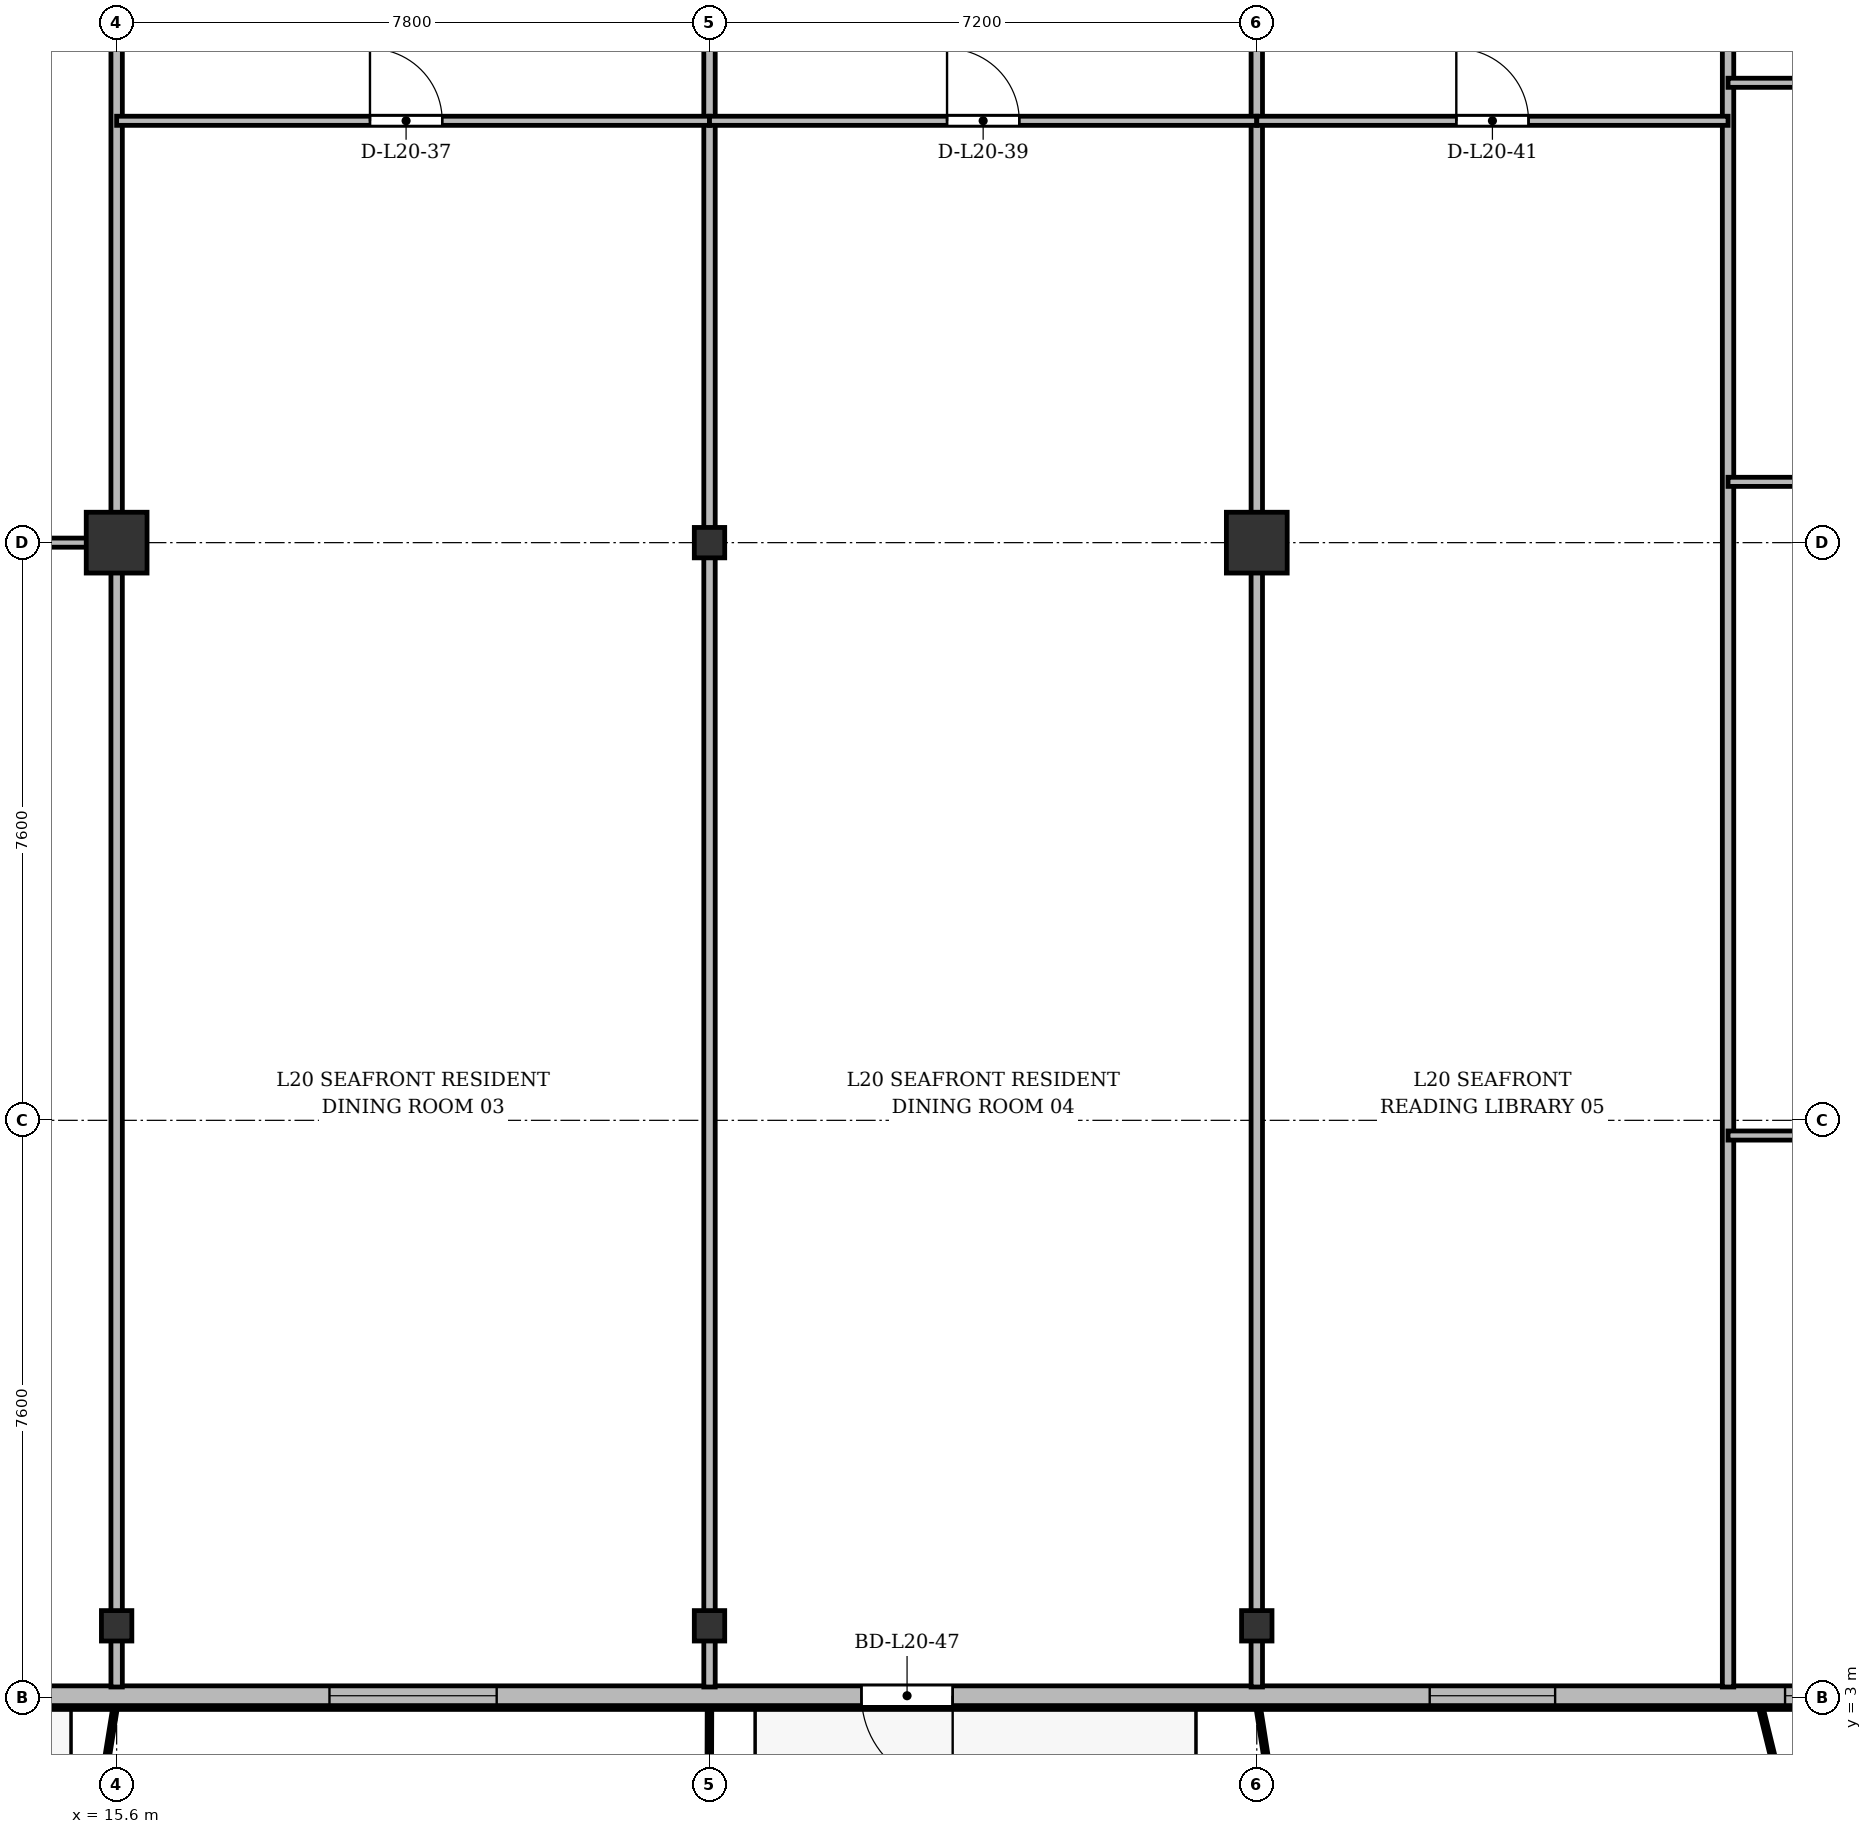
"""IFC4 building model, lengths in metres.
Left out: names, types, materials, properties, quantities, classifications, styles, units other than length and angle.
Written with IfcOpenShell. Run it as: python <this file> out.ifc"""

import sys

from ifc_helpers import new_model, si_unit, direction, frame, frame_2d, origin, origin_2d, place, context, subcontext, project, spatial, rectangle, i_section, extrude, source, transform, mapped, element, fill, save


model = new_model("IFC4")
c1 = context("Model", 3, precision=1e-05, world=origin(), true_north=direction((0.0, 1.0)))
c2 = subcontext(c1, "Body", "Model", "MODEL_VIEW")
j1 = project(units=[si_unit("LENGTHUNIT", "METRE"), si_unit("PLANEANGLEUNIT", "RADIAN")], contexts=[c1])
p1 = place(None, origin())
s1 = spatial("IfcSite", under=j1, at=p1, CompositionType="ELEMENT")
p2 = place(p1, origin())
s2 = spatial("IfcBuilding", under=s1, at=p2, CompositionType="ELEMENT")
p3 = place(p2, frame((0.0, 0.0, 81.7)))
s3 = spatial("IfcBuildingStorey", under=s2, at=p3, CompositionType="ELEMENT", Elevation=81.7)
m1 = source(origin(), c2, "Body", "SweptSolid", [
    extrude(i_section(OverallWidth=0.4, OverallDepth=0.4, WebThickness=0.022, FlangeThickness=0.035, at=origin_2d()), origin(), (0.0, 0.0, 1.0), 3.6),
])
p4 = place(p3, frame((15.6, 3.95, 0.0), z_axis=(0.0, 0.0, 1.0), x_axis=(1.0, 0.0, 0.0)))
e1 = element("IfcColumn", 1, at=p4, inside=s3, PredefinedType="COLUMN", context=c2, shape_type="MappedRepresentation", body=[
    mapped(m1, transform((0.0, 0.0, 0.0), x_axis=(1.0, 0.0, 0.0), y_axis=(0.0, 1.0, 0.0), z_axis=(0.0, 0.0, 1.0), scale=1.0)),
])
m2 = source(origin(), c2, "Body", "SweptSolid", [
    extrude(rectangle(XDim=0.8, YDim=0.8, at=origin_2d()), origin(), (0.0, 0.0, 1.0), 3.6),
])
p5 = place(p3, frame((15.6, 18.2, 0.0), z_axis=(0.0, 0.0, 1.0), x_axis=(1.0, 0.0, 0.0)))
e2 = element("IfcColumn", 2, at=p5, inside=s3, PredefinedType="COLUMN", context=c2, shape_type="MappedRepresentation", body=[
    mapped(m2, transform((0.0, 0.0, 0.0), x_axis=(1.0, 0.0, 0.0), y_axis=(0.0, 1.0, 0.0), z_axis=(0.0, 0.0, 1.0), scale=1.0)),
])
for number, where, z_axis, x_axis in (
    (3, (23.4, 3.95, 0.0), (0.0, 0.0, 1.0), (1.0, 0.0, 0.0)),
    (4, (23.4, 18.2, 0.0), (0.0, 0.0, 1.0), (1.0, 0.0, 0.0)),
    (5, (30.6, 3.95, 0.0), (0.0, 0.0, 1.0), (1.0, 0.0, 0.0)),
):
    element("IfcColumn", number, at=place(p3, frame(where, z_axis=z_axis, x_axis=x_axis)), inside=s3, PredefinedType="COLUMN", context=c2, shape_type="MappedRepresentation", body=[
        mapped(m1, transform((0.0, 0.0, 0.0), x_axis=(1.0, 0.0, 0.0), y_axis=(0.0, 1.0, 0.0), z_axis=(0.0, 0.0, 1.0), scale=1.0)),
    ])
p6 = place(p3, frame((30.6, 18.2, 0.0), z_axis=(0.0, 0.0, 1.0), x_axis=(1.0, 0.0, 0.0)))
e6 = element("IfcColumn", 6, at=p6, inside=s3, PredefinedType="COLUMN", context=c2, shape_type="MappedRepresentation", body=[
    mapped(m2, transform((0.0, 0.0, 0.0), x_axis=(1.0, 0.0, 0.0), y_axis=(0.0, 1.0, 0.0), z_axis=(0.0, 0.0, 1.0), scale=1.0)),
])
p7 = place(p3, frame((66.9, 3.03, 0.0), z_axis=(0.0, 0.0, 1.0), x_axis=(-1.0, 0.0, 0.0)))
e7 = element("IfcWall", 7, at=p7, inside=s3, PredefinedType="SOLIDWALL", context=c2, shape_type="SweptSolid", body=[
    extrude(rectangle(XDim=59.4, YDim=0.26, at=frame_2d((29.7, 0.0))), origin(), (0.0, 0.0, 1.0), 3.34),
])
p8 = place(p7, frame((0.795, 0.0, 0.9)))
e8 = element("IfcOpeningElement", 8, at=p8, cuts=e7, PredefinedType="OPENING", context=c2, shape_type="SweptSolid", body=[
    extrude(rectangle(XDim=1.8, YDim=1.8, at=frame_2d((0.9, 0.9))), frame((0.0, 0.14, 0.0), z_axis=(0.0, -1.0, 0.0), x_axis=(1.0, 0.0, 0.0)), (0.0, 0.0, 1.0), 0.28),
])
p9 = place(p7, frame((4.6, 0.0, 0.9)))
e9 = element("IfcOpeningElement", 9, at=p9, cuts=e7, PredefinedType="OPENING", context=c2, shape_type="SweptSolid", body=[
    extrude(rectangle(XDim=2.2, YDim=1.8, at=frame_2d((1.1, 0.9))), frame((0.0, 0.14, 0.0), z_axis=(0.0, -1.0, 0.0), x_axis=(1.0, 0.0, 0.0)), (0.0, 0.0, 1.0), 0.28),
])
p10 = place(p7, frame((9.18, 0.0, 0.0)))
e10 = element("IfcOpeningElement", 10, at=p10, cuts=e7, PredefinedType="OPENING", context=c2, shape_type="SweptSolid", body=[
    extrude(rectangle(XDim=1.2, YDim=2.2, at=frame_2d((0.6, 1.1))), frame((0.0, 0.14, 0.0), z_axis=(0.0, -1.0, 0.0), x_axis=(1.0, 0.0, 0.0)), (0.0, 0.0, 1.0), 0.28),
])
p11 = place(p7, frame((12.95, 0.0, 0.9)))
e11 = element("IfcOpeningElement", 11, at=p11, cuts=e7, PredefinedType="OPENING", context=c2, shape_type="SweptSolid", body=[
    extrude(rectangle(XDim=2.0, YDim=1.95, at=frame_2d((1.0, 0.975))), frame((0.0, 0.14, 0.0), z_axis=(0.0, -1.0, 0.0), x_axis=(1.0, 0.0, 0.0)), (0.0, 0.0, 1.0), 0.28),
])
p12 = place(p7, frame((16.275, 0.0, 0.9)))
e12 = element("IfcOpeningElement", 12, at=p12, cuts=e7, PredefinedType="OPENING", context=c2, shape_type="SweptSolid", body=[
    extrude(rectangle(XDim=1.65, YDim=1.85, at=frame_2d((0.825, 0.925))), frame((0.0, 0.14, 0.0), z_axis=(0.0, -1.0, 0.0), x_axis=(1.0, 0.0, 0.0)), (0.0, 0.0, 1.0), 0.28),
])
p13 = place(p7, frame((18.6, 0.0, 0.9)))
e13 = element("IfcOpeningElement", 13, at=p13, cuts=e7, PredefinedType="OPENING", context=c2, shape_type="SweptSolid", body=[
    extrude(rectangle(XDim=1.8, YDim=1.8, at=frame_2d((0.9, 0.9))), frame((0.0, 0.14, 0.0), z_axis=(0.0, -1.0, 0.0), x_axis=(1.0, 0.0, 0.0)), (0.0, 0.0, 1.0), 0.28),
])
p14 = place(p7, frame((21.15, 0.0, 0.9)))
e14 = element("IfcOpeningElement", 14, at=p14, cuts=e7, PredefinedType="OPENING", context=c2, shape_type="SweptSolid", body=[
    extrude(rectangle(XDim=1.5, YDim=1.75, at=frame_2d((0.75, 0.875))), frame((0.0, 0.14, 0.0), z_axis=(0.0, -1.0, 0.0), x_axis=(1.0, 0.0, 0.0)), (0.0, 0.0, 1.0), 0.28),
])
p15 = place(p7, frame((24.1, 0.0, 0.9)))
e15 = element("IfcOpeningElement", 15, at=p15, cuts=e7, PredefinedType="OPENING", context=c2, shape_type="SweptSolid", body=[
    extrude(rectangle(XDim=1.5, YDim=1.75, at=frame_2d((0.75, 0.875))), frame((0.0, 0.14, 0.0), z_axis=(0.0, -1.0, 0.0), x_axis=(1.0, 0.0, 0.0)), (0.0, 0.0, 1.0), 0.28),
])
p16 = place(p7, frame((27.35, 0.0, 0.9)))
e16 = element("IfcOpeningElement", 16, at=p16, cuts=e7, PredefinedType="OPENING", context=c2, shape_type="SweptSolid", body=[
    extrude(rectangle(XDim=2.0, YDim=1.95, at=frame_2d((1.0, 0.975))), frame((0.0, 0.14, 0.0), z_axis=(0.0, -1.0, 0.0), x_axis=(1.0, 0.0, 0.0)), (0.0, 0.0, 1.0), 0.28),
])
p17 = place(p7, frame((32.375, 0.0, 0.9)))
e17 = element("IfcOpeningElement", 17, at=p17, cuts=e7, PredefinedType="OPENING", context=c2, shape_type="SweptSolid", body=[
    extrude(rectangle(XDim=1.65, YDim=1.85, at=frame_2d((0.825, 0.925))), frame((0.0, 0.14, 0.0), z_axis=(0.0, -1.0, 0.0), x_axis=(1.0, 0.0, 0.0)), (0.0, 0.0, 1.0), 0.28),
])
p18 = place(p7, frame((40.301, 0.0, 0.0)))
e18 = element("IfcOpeningElement", 18, at=p18, cuts=e7, PredefinedType="OPENING", context=c2, shape_type="SweptSolid", body=[
    extrude(rectangle(XDim=1.2, YDim=2.2, at=frame_2d((0.6, 1.1))), frame((0.0, 0.14, 0.0), z_axis=(0.0, -1.0, 0.0), x_axis=(1.0, 0.0, 0.0)), (0.0, 0.0, 1.0), 0.28),
])
p19 = place(p7, frame((46.3, 0.0, 0.9)))
e19 = element("IfcOpeningElement", 19, at=p19, cuts=e7, PredefinedType="OPENING", context=c2, shape_type="SweptSolid", body=[
    extrude(rectangle(XDim=2.2, YDim=1.8, at=frame_2d((1.1, 0.9))), frame((0.0, 0.14, 0.0), z_axis=(0.0, -1.0, 0.0), x_axis=(1.0, 0.0, 0.0)), (0.0, 0.0, 1.0), 0.28),
])
p20 = place(p7, frame((54.558, 0.0, 0.0)))
e20 = element("IfcOpeningElement", 20, at=p20, cuts=e7, PredefinedType="OPENING", context=c2, shape_type="SweptSolid", body=[
    extrude(rectangle(XDim=1.2, YDim=2.2, at=frame_2d((0.6, 1.1))), frame((0.0, 0.14, 0.0), z_axis=(0.0, -1.0, 0.0), x_axis=(1.0, 0.0, 0.0)), (0.0, 0.0, 1.0), 0.28),
])
p21 = place(p7, frame((56.805, 0.0, 0.9)))
e21 = element("IfcOpeningElement", 21, at=p21, cuts=e7, PredefinedType="OPENING", context=c2, shape_type="SweptSolid", body=[
    extrude(rectangle(XDim=2.0, YDim=1.95, at=frame_2d((1.0, 0.975))), frame((0.0, 0.14, 0.0), z_axis=(0.0, -1.0, 0.0), x_axis=(1.0, 0.0, 0.0)), (0.0, 0.0, 1.0), 0.28),
])
for number, where, z_axis, x_axis in (
    (22, (15.6, 3.145, 0.0), (0.0, 0.0, 1.0), (0.0, 1.0, 0.0)),
    (23, (23.4, 3.145, 0.0), (0.0, 0.0, 1.0), (0.0, 1.0, 0.0)),
    (24, (30.6, 3.145, 0.0), (0.0, 0.0, 1.0), (0.0, 1.0, 0.0)),
):
    element("IfcWall", number, at=place(p3, frame(where, z_axis=z_axis, x_axis=x_axis)), inside=s3, PredefinedType="PARTITIONING", context=c2, shape_type="SweptSolid", body=[
        extrude(rectangle(XDim=24.455, YDim=0.15, at=frame_2d((12.228, 0.0))), origin(), (0.0, 0.0, 1.0), 2.84),
    ])
p22 = place(p3, frame((36.8, 3.145, 0.0), z_axis=(0.0, 0.0, 1.0), x_axis=(0.0, 1.0, 0.0)))
e25 = element("IfcWall", 25, at=p22, inside=s3, PredefinedType="PARTITIONING", context=c2, shape_type="SweptSolid", body=[
    extrude(rectangle(XDim=24.455, YDim=0.15, at=frame_2d((12.228, 0.0))), origin(), (0.0, 0.0, 1.0), 2.752),
])
p23 = place(p3, frame((10.6, 18.2, 0.0), z_axis=(0.0, 0.0, 1.0), x_axis=(1.0, 0.0, 0.0)))
e26 = element("IfcWall", 26, at=p23, inside=s3, PredefinedType="PARTITIONING", context=c2, shape_type="SweptSolid", body=[
    extrude(rectangle(XDim=5.0, YDim=0.12, at=frame_2d((2.5, 0.0))), origin(), (0.0, 0.0, 1.0), 2.752),
])
p24 = place(p23, frame((2.025, 0.0, 0.0)))
e27 = element("IfcOpeningElement", 27, at=p24, cuts=e26, PredefinedType="OPENING", context=c2, shape_type="SweptSolid", body=[
    extrude(rectangle(XDim=0.95, YDim=2.15, at=frame_2d((0.475, 1.075))), frame((0.0, 0.07, 0.0), z_axis=(0.0, -1.0, 0.0), x_axis=(1.0, 0.0, 0.0)), (0.0, 0.0, 1.0), 0.14),
])
p25 = place(p3, frame((15.6, 23.75, 0.0), z_axis=(0.0, 0.0, 1.0), x_axis=(1.0, 0.0, 0.0)))
e28 = element("IfcWall", 28, at=p25, inside=s3, PredefinedType="PARTITIONING", context=c2, shape_type="SweptSolid", body=[
    extrude(rectangle(XDim=7.8, YDim=0.12, at=frame_2d((3.9, 0.0))), origin(), (0.0, 0.0, 1.0), 2.84),
])
p26 = place(p25, frame((3.333, 0.0, 0.0)))
e29 = element("IfcOpeningElement", 29, at=p26, cuts=e28, PredefinedType="OPENING", context=c2, shape_type="SweptSolid", body=[
    extrude(rectangle(XDim=0.95, YDim=2.15, at=frame_2d((0.475, 1.075))), frame((0.0, 0.07, 0.0), z_axis=(0.0, -1.0, 0.0), x_axis=(1.0, 0.0, 0.0)), (0.0, 0.0, 1.0), 0.14),
])
p27 = place(p3, frame((23.4, 23.75, 0.0), z_axis=(0.0, 0.0, 1.0), x_axis=(1.0, 0.0, 0.0)))
e30 = element("IfcWall", 30, at=p27, inside=s3, PredefinedType="PARTITIONING", context=c2, shape_type="SweptSolid", body=[
    extrude(rectangle(XDim=7.2, YDim=0.12, at=frame_2d((3.6, 0.0))), origin(), (0.0, 0.0, 1.0), 2.84),
])
p28 = place(p27, frame((3.125, 0.0, 0.0)))
e31 = element("IfcOpeningElement", 31, at=p28, cuts=e30, PredefinedType="OPENING", context=c2, shape_type="SweptSolid", body=[
    extrude(rectangle(XDim=0.95, YDim=2.15, at=frame_2d((0.475, 1.075))), frame((0.0, 0.07, 0.0), z_axis=(0.0, -1.0, 0.0), x_axis=(1.0, 0.0, 0.0)), (0.0, 0.0, 1.0), 0.14),
])
p29 = place(p3, frame((30.6, 23.75, 0.0), z_axis=(0.0, 0.0, 1.0), x_axis=(1.0, 0.0, 0.0)))
e32 = element("IfcWall", 32, at=p29, inside=s3, PredefinedType="PARTITIONING", context=c2, shape_type="SweptSolid", body=[
    extrude(rectangle(XDim=6.2, YDim=0.12, at=frame_2d((3.1, 0.0))), origin(), (0.0, 0.0, 1.0), 2.84),
])
p30 = place(p29, frame((2.625, 0.0, 0.0)))
e33 = element("IfcOpeningElement", 33, at=p30, cuts=e32, PredefinedType="OPENING", context=c2, shape_type="SweptSolid", body=[
    extrude(rectangle(XDim=0.95, YDim=2.15, at=frame_2d((0.475, 1.075))), frame((0.0, 0.07, 0.0), z_axis=(0.0, -1.0, 0.0), x_axis=(1.0, 0.0, 0.0)), (0.0, 0.0, 1.0), 0.14),
])
p31 = place(p3, frame((36.8, 19.0, 0.0), z_axis=(0.0, 0.0, 1.0), x_axis=(1.0, 0.0, 0.0)))
e34 = element("IfcWall", 34, at=p31, inside=s3, PredefinedType="PARTITIONING", context=c2, shape_type="SweptSolid", body=[
    extrude(rectangle(XDim=7.0, YDim=0.12, at=frame_2d((3.5, 0.0))), origin(), (0.0, 0.0, 1.0), 2.84),
])
p32 = place(p31, frame((2.934, 0.0, 0.0)))
e35 = element("IfcOpeningElement", 35, at=p32, cuts=e34, PredefinedType="OPENING", context=c2, shape_type="SweptSolid", body=[
    extrude(rectangle(XDim=0.95, YDim=2.15, at=frame_2d((0.475, 1.075))), frame((0.0, 0.07, 0.0), z_axis=(0.0, -1.0, 0.0), x_axis=(1.0, 0.0, 0.0)), (0.0, 0.0, 1.0), 0.14),
])
p33 = place(p3, frame((36.8, 24.25, 0.0), z_axis=(0.0, 0.0, 1.0), x_axis=(1.0, 0.0, 0.0)))
e36 = element("IfcWall", 36, at=p33, inside=s3, PredefinedType="PARTITIONING", context=c2, shape_type="SweptSolid", body=[
    extrude(rectangle(XDim=2.4, YDim=0.12, at=frame_2d((1.2, 0.0))), origin(), (0.0, 0.0, 1.0), 3.34),
])
p34 = place(p3, frame((36.8, 10.4, 0.0), z_axis=(0.0, 0.0, 1.0), x_axis=(1.0, 0.0, 0.0)))
e37 = element("IfcWall", 37, at=p34, inside=s3, PredefinedType="PARTITIONING", context=c2, shape_type="SweptSolid", body=[
    extrude(rectangle(XDim=3.5, YDim=0.12, at=frame_2d((1.75, 0.0))), origin(), (0.0, 0.0, 1.0), 3.34),
])
p35 = place(p34, frame((1.176, 0.0, 0.0)))
e38 = element("IfcOpeningElement", 38, at=p35, cuts=e37, PredefinedType="OPENING", context=c2, shape_type="SweptSolid", body=[
    extrude(rectangle(XDim=0.95, YDim=2.15, at=frame_2d((0.475, 1.075))), frame((0.0, 0.07, 0.0), z_axis=(0.0, -1.0, 0.0), x_axis=(1.0, 0.0, 0.0)), (0.0, 0.0, 1.0), 0.14),
])
m3 = source(origin(), c2, "Body", "SweptSolid", [
    extrude(rectangle(XDim=2.0, YDim=1.95, at=frame_2d((1.0, 0.975))), frame((0.0, 0.03, 0.0), z_axis=(0.0, -1.0, 0.0), x_axis=(1.0, 0.0, 0.0)), (0.0, 0.0, 1.0), 0.06),
])
p36 = place(p16, origin())
e39 = element("IfcWindow", 39, at=p36, inside=s3, PartitioningType="SINGLE_PANEL", PredefinedType="WINDOW", context=c2, shape_type="MappedRepresentation", body=[
    mapped(m3, transform((0.0, 0.0, 0.0), x_axis=(1.0, 0.0, 0.0), y_axis=(0.0, 1.0, 0.0), z_axis=(0.0, 0.0, 1.0), scale=1.0)),
])
fill(e16, e39)
m4 = source(origin(), c2, "Body", "SweptSolid", [
    extrude(rectangle(XDim=1.65, YDim=1.85, at=frame_2d((0.825, 0.925))), frame((0.0, 0.03, 0.0), z_axis=(0.0, -1.0, 0.0), x_axis=(1.0, 0.0, 0.0)), (0.0, 0.0, 1.0), 0.06),
])
p37 = place(p17, origin())
e40 = element("IfcWindow", 40, at=p37, inside=s3, PartitioningType="SINGLE_PANEL", PredefinedType="WINDOW", context=c2, shape_type="MappedRepresentation", body=[
    mapped(m4, transform((0.0, 0.0, 0.0), x_axis=(1.0, 0.0, 0.0), y_axis=(0.0, 1.0, 0.0), z_axis=(0.0, 0.0, 1.0), scale=1.0)),
])
fill(e17, e40)
m5 = source(origin(), c2, "Body", "SweptSolid", [
    extrude(rectangle(XDim=1.2, YDim=2.2, at=frame_2d((0.6, 1.1))), frame((0.0, 0.025, 0.0), z_axis=(0.0, -1.0, 0.0), x_axis=(1.0, 0.0, 0.0)), (0.0, 0.0, 1.0), 0.05),
])
p38 = place(p18, origin())
e41 = element("IfcDoor", 41, at=p38, inside=s3, OperationType="SINGLE_SWING_LEFT", PredefinedType="DOOR", context=c2, shape_type="MappedRepresentation", body=[
    mapped(m5, transform((0.0, 0.0, 0.0), x_axis=(1.0, 0.0, 0.0), y_axis=(0.0, 1.0, 0.0), z_axis=(0.0, 0.0, 1.0), scale=1.0)),
])
fill(e18, e41)
m6 = source(origin(), c2, "Body", "SweptSolid", [
    extrude(rectangle(XDim=2.2, YDim=1.8, at=frame_2d((1.1, 0.9))), frame((0.0, 0.03, 0.0), z_axis=(0.0, -1.0, 0.0), x_axis=(1.0, 0.0, 0.0)), (0.0, 0.0, 1.0), 0.06),
])
p39 = place(p19, origin())
e42 = element("IfcWindow", 42, at=p39, inside=s3, PartitioningType="SINGLE_PANEL", PredefinedType="WINDOW", context=c2, shape_type="MappedRepresentation", body=[
    mapped(m6, transform((0.0, 0.0, 0.0), x_axis=(1.0, 0.0, 0.0), y_axis=(0.0, 1.0, 0.0), z_axis=(0.0, 0.0, 1.0), scale=1.0)),
])
fill(e19, e42)
m7 = source(origin(), c2, "Body", "SweptSolid", [
    extrude(rectangle(XDim=0.95, YDim=2.15, at=frame_2d((0.475, 1.075))), frame((0.0, 0.025, 0.0), z_axis=(0.0, -1.0, 0.0), x_axis=(1.0, 0.0, 0.0)), (0.0, 0.0, 1.0), 0.05),
])
p40 = place(p26, origin())
e43 = element("IfcDoor", 43, at=p40, inside=s3, OperationType="SINGLE_SWING_LEFT", PredefinedType="DOOR", context=c2, shape_type="MappedRepresentation", body=[
    mapped(m7, transform((0.0, 0.0, 0.0), x_axis=(1.0, 0.0, 0.0), y_axis=(0.0, 1.0, 0.0), z_axis=(0.0, 0.0, 1.0), scale=1.0)),
])
fill(e29, e43)
p41 = place(p28, origin())
e44 = element("IfcDoor", 44, at=p41, inside=s3, OperationType="SINGLE_SWING_LEFT", PredefinedType="DOOR", context=c2, shape_type="MappedRepresentation", body=[
    mapped(m7, transform((0.0, 0.0, 0.0), x_axis=(1.0, 0.0, 0.0), y_axis=(0.0, 1.0, 0.0), z_axis=(0.0, 0.0, 1.0), scale=1.0)),
])
fill(e31, e44)
p42 = place(p30, origin())
e45 = element("IfcDoor", 45, at=p42, inside=s3, OperationType="SINGLE_SWING_LEFT", PredefinedType="DOOR", context=c2, shape_type="MappedRepresentation", body=[
    mapped(m7, transform((0.0, 0.0, 0.0), x_axis=(1.0, 0.0, 0.0), y_axis=(0.0, 1.0, 0.0), z_axis=(0.0, 0.0, 1.0), scale=1.0)),
])
fill(e33, e45)
save(model, sys.argv[1])
